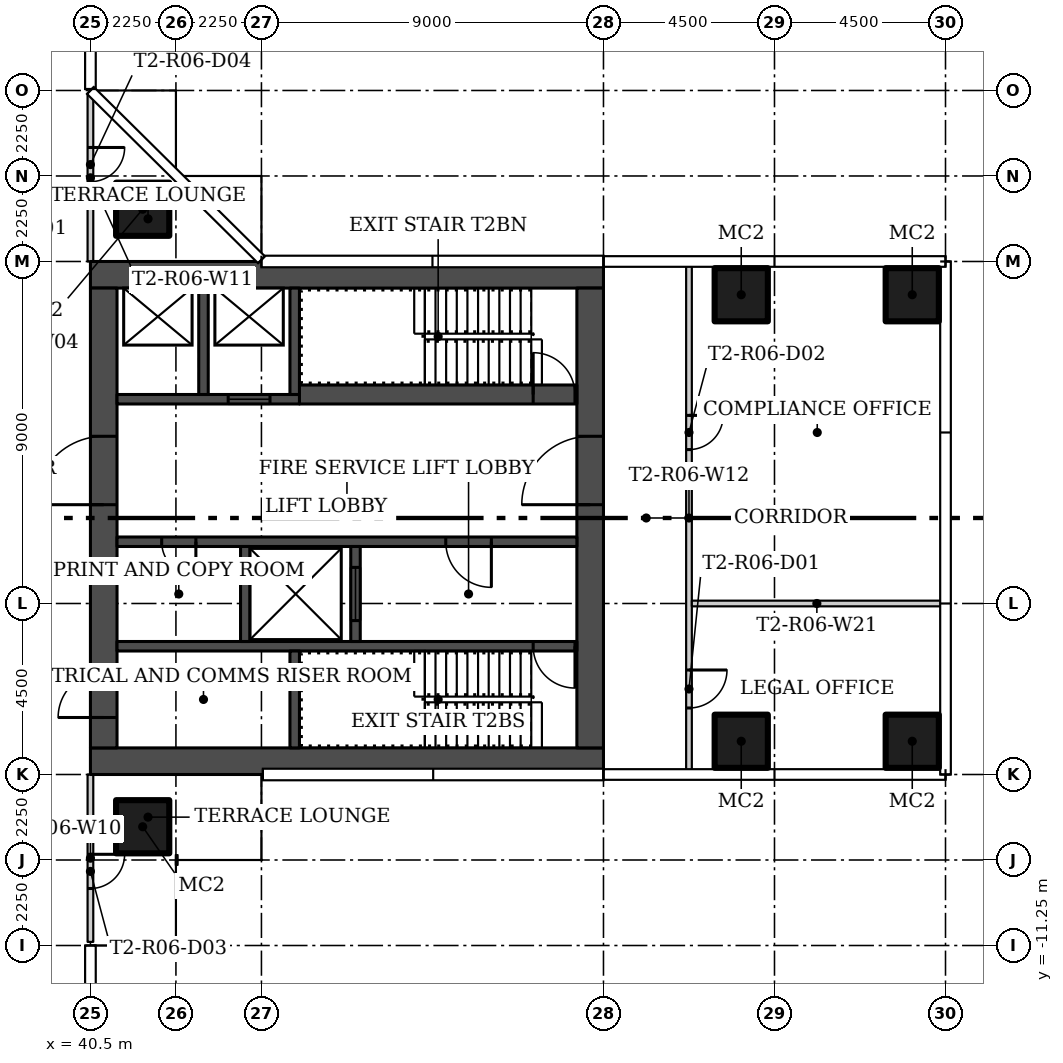
"""IFC4 building model, lengths in metres.
Left out: names, types, materials, properties, quantities, classifications, styles, units other than length and angle.
Written with IfcOpenShell. Run it as: python <this file> out.ifc"""

import sys

from ifc_helpers import new_model, si_unit, direction, frame, frame_2d, origin, origin_2d, place, context, subcontext, project, spatial, rectangle, hollow_rectangle, extrude, element, fill, save


model = new_model("IFC4")
c1 = context("Model", 3, precision=1e-05, world=origin(), true_north=direction((0.0, 1.0)))
c2 = subcontext(c1, "Body", "Model", "MODEL_VIEW")
j1 = project(units=[si_unit("LENGTHUNIT", "METRE"), si_unit("PLANEANGLEUNIT", "RADIAN")], contexts=[c1])
p1 = place(None, origin())
s1 = spatial("IfcSite", under=j1, at=p1, CompositionType="ELEMENT")
p2 = place(p1, origin())
s2 = spatial("IfcBuilding", under=s1, at=p2, CompositionType="ELEMENT")
p3 = place(p2, frame((0.0, 0.0, 61.5)))
s3 = spatial("IfcBuildingStorey", under=s2, at=p3, CompositionType="ELEMENT", Elevation=61.5)
for number, where in (
    (1, (41.875, 8.125, 0.0)),
    (2, (41.875, -8.125, 0.0)),
    (3, (57.625, -5.875, 0.0)),
    (4, (62.125, -5.875, 0.0)),
    (5, (57.625, 5.875, 0.0)),
    (6, (62.125, 5.875, 0.0)),
):
    element("IfcColumn", number, at=place(p3, frame(where)), inside=s3, PredefinedType="COLUMN", context=c2, shape_type="SweptSolid", body=[
        extrude(hollow_rectangle(XDim=1.4, YDim=1.4, WallThickness=0.05, at=origin_2d()), origin(), (0.0, 0.0, 1.0), 3.55),
    ])
p4 = place(p3, frame((40.5, -6.75, 0.0), z_axis=(0.0, 0.0, 1.0), x_axis=(0.0, -1.0, 0.0)))
e7 = element("IfcWall", 7, at=p4, inside=s3, PredefinedType="PARTITIONING", context=c2, shape_type="SweptSolid", body=[
    extrude(rectangle(XDim=4.405, YDim=0.15, at=frame_2d((2.203, 0.0))), origin(), (0.0, 0.0, 1.0), 3.55),
])
p5 = place(p4, frame((2.1, 0.0, 0.0)))
e8 = element("IfcOpeningElement", 8, at=p5, cuts=e7, PredefinedType="OPENING", context=c2, shape_type="SweptSolid", body=[
    extrude(rectangle(XDim=0.9, YDim=2.1, at=frame_2d((0.45, 1.05))), frame((0.0, 0.085, 0.0), z_axis=(0.0, -1.0, 0.0), x_axis=(1.0, 0.0, 0.0)), (0.0, 0.0, 1.0), 0.17),
])
p6 = place(p3, frame((40.5, 11.155, 0.0), z_axis=(0.0, 0.0, 1.0), x_axis=(0.0, -1.0, 0.0)))
e9 = element("IfcWall", 9, at=p6, inside=s3, PredefinedType="PARTITIONING", context=c2, shape_type="SweptSolid", body=[
    extrude(rectangle(XDim=4.405, YDim=0.15, at=frame_2d((2.203, 0.0))), origin(), (0.0, 0.0, 1.0), 3.55),
])
p7 = place(p6, frame((1.405, 0.0, 0.0)))
e10 = element("IfcOpeningElement", 10, at=p7, cuts=e9, PredefinedType="OPENING", context=c2, shape_type="SweptSolid", body=[
    extrude(rectangle(XDim=0.9, YDim=2.1, at=frame_2d((0.45, 1.05))), frame((0.0, 0.085, 0.0), z_axis=(0.0, -1.0, 0.0), x_axis=(1.0, 0.0, 0.0)), (0.0, 0.0, 1.0), 0.17),
])
p8 = place(p3, frame((56.25, 6.655, 0.0), z_axis=(0.0, 0.0, 1.0), x_axis=(0.0, -1.0, 0.0)))
e11 = element("IfcWall", 11, at=p8, inside=s3, PredefinedType="PARTITIONING", context=c2, shape_type="SweptSolid", body=[
    extrude(rectangle(XDim=13.31, YDim=0.15, at=frame_2d((6.655, 0.0))), origin(), (0.0, 0.0, 1.0), 3.55),
])
p9 = place(p8, frame((10.655, 0.0, 0.0)))
e12 = element("IfcOpeningElement", 12, at=p9, cuts=e11, PredefinedType="OPENING", context=c2, shape_type="SweptSolid", body=[
    extrude(rectangle(XDim=1.0, YDim=2.4, at=frame_2d((0.5, 1.2))), frame((0.0, 0.085, 0.0), z_axis=(0.0, -1.0, 0.0), x_axis=(1.0, 0.0, 0.0)), (0.0, 0.0, 1.0), 0.17),
])
p10 = place(p8, frame((3.955, 0.0, 0.0)))
e13 = element("IfcOpeningElement", 13, at=p10, cuts=e11, PredefinedType="OPENING", context=c2, shape_type="SweptSolid", body=[
    extrude(rectangle(XDim=0.9, YDim=2.1, at=frame_2d((0.45, 1.05))), frame((0.0, 0.085, 0.0), z_axis=(0.0, -1.0, 0.0), x_axis=(1.0, 0.0, 0.0)), (0.0, 0.0, 1.0), 0.17),
])
p11 = place(p3, frame((62.905, -2.25, 0.0), z_axis=(0.0, 0.0, 1.0), x_axis=(-1.0, 0.0, 0.0)))
e14 = element("IfcWall", 14, at=p11, inside=s3, PredefinedType="PARTITIONING", context=c2, shape_type="SweptSolid", body=[
    extrude(rectangle(XDim=6.58, YDim=0.15, at=frame_2d((3.29, 0.0))), origin(), (0.0, 0.0, 1.0), 3.55),
])
for number, where, z_axis, x_axis in (
    (15, (54.0, -6.4, 0.0), (0.0, 0.0, 1.0), (-1.0, 0.0, 0.0)),
    (16, (54.0, 6.4, 0.0), (0.0, 0.0, 1.0), (-1.0, 0.0, 0.0)),
):
    element("IfcWall", number, at=place(p3, frame(where, z_axis=z_axis, x_axis=x_axis)), inside=s3, PredefinedType="SHEAR", context=c2, shape_type="SweptSolid", body=[
        extrude(rectangle(XDim=13.5, YDim=0.7, at=frame_2d((6.75, 0.0))), origin(), (0.0, 0.0, 1.0), 3.55),
    ])
p12 = place(p3, frame((53.65, -6.05, 0.0), z_axis=(0.0, 0.0, 1.0), x_axis=(0.0, 1.0, 0.0)))
e17 = element("IfcWall", 17, at=p12, inside=s3, PredefinedType="SHEAR", context=c2, shape_type="SweptSolid", body=[
    extrude(rectangle(XDim=12.1, YDim=0.7, at=frame_2d((6.05, 0.0))), origin(), (0.0, 0.0, 1.0), 3.55),
])
p13 = place(p12, frame((6.4, 0.0, 0.0)))
e18 = element("IfcOpeningElement", 18, at=p13, cuts=e17, PredefinedType="OPENING", context=c2, shape_type="SweptSolid", body=[
    extrude(rectangle(XDim=1.8, YDim=2.4, at=frame_2d((0.9, 1.2))), frame((0.0, 0.36, 0.0), z_axis=(0.0, -1.0, 0.0), x_axis=(1.0, 0.0, 0.0)), (0.0, 0.0, 1.0), 0.72),
])
p14 = place(p3, frame((40.85, -6.05, 0.0), z_axis=(0.0, 0.0, 1.0), x_axis=(0.0, 1.0, 0.0)))
e19 = element("IfcWall", 19, at=p14, inside=s3, PredefinedType="SHEAR", context=c2, shape_type="SweptSolid", body=[
    extrude(rectangle(XDim=12.1, YDim=0.7, at=frame_2d((6.05, 0.0))), origin(), (0.0, 0.0, 1.0), 3.55),
])
p15 = place(p14, frame((0.8, 0.0, 0.0)))
e20 = element("IfcOpeningElement", 20, at=p15, cuts=e19, PredefinedType="OPENING", context=c2, shape_type="SweptSolid", body=[
    extrude(rectangle(XDim=1.2, YDim=2.1, at=frame_2d((0.6, 1.05))), frame((0.0, 0.36, 0.0), z_axis=(0.0, -1.0, 0.0), x_axis=(1.0, 0.0, 0.0)), (0.0, 0.0, 1.0), 0.72),
])
p16 = place(p14, frame((6.4, 0.0, 0.0)))
e21 = element("IfcOpeningElement", 21, at=p16, cuts=e19, PredefinedType="OPENING", context=c2, shape_type="SweptSolid", body=[
    extrude(rectangle(XDim=1.8, YDim=2.4, at=frame_2d((0.9, 1.2))), frame((0.0, 0.36, 0.0), z_axis=(0.0, -1.0, 0.0), x_axis=(1.0, 0.0, 0.0)), (0.0, 0.0, 1.0), 0.72),
])
p17 = place(p3, frame((53.3, -3.375, 0.0), z_axis=(0.0, 0.0, 1.0), x_axis=(-1.0, 0.0, 0.0)))
e22 = element("IfcWall", 22, at=p17, inside=s3, PredefinedType="SHEAR", context=c2, shape_type="SweptSolid", body=[
    extrude(rectangle(XDim=12.1, YDim=0.25, at=frame_2d((6.05, 0.0))), origin(), (0.0, 0.0, 1.0), 3.55),
])
p18 = place(p17, frame((0.05, 0.0, 0.0)))
e23 = element("IfcOpeningElement", 23, at=p18, cuts=e22, PredefinedType="OPENING", context=c2, shape_type="SweptSolid", body=[
    extrude(rectangle(XDim=1.1, YDim=2.1, at=frame_2d((0.55, 1.05))), frame((0.0, 0.135, 0.0), z_axis=(0.0, -1.0, 0.0), x_axis=(1.0, 0.0, 0.0)), (0.0, 0.0, 1.0), 0.27),
])
p19 = place(p3, frame((45.875, -6.05, 0.0), z_axis=(0.0, 0.0, 1.0), x_axis=(0.0, 1.0, 0.0)))
e24 = element("IfcWall", 24, at=p19, inside=s3, PredefinedType="SHEAR", context=c2, shape_type="SweptSolid", body=[
    extrude(rectangle(XDim=2.55, YDim=0.25, at=frame_2d((1.275, 0.0))), origin(), (0.0, 0.0, 1.0), 3.55),
])
p20 = place(p3, frame((53.3, -0.625, 0.0), z_axis=(0.0, 0.0, 1.0), x_axis=(-1.0, 0.0, 0.0)))
e25 = element("IfcWall", 25, at=p20, inside=s3, PredefinedType="SHEAR", context=c2, shape_type="SweptSolid", body=[
    extrude(rectangle(XDim=12.1, YDim=0.25, at=frame_2d((6.05, 0.0))), origin(), (0.0, 0.0, 1.0), 3.55),
])
p21 = place(p20, frame((2.25, 0.0, 0.0)))
e26 = element("IfcOpeningElement", 26, at=p21, cuts=e25, PredefinedType="OPENING", context=c2, shape_type="SweptSolid", body=[
    extrude(rectangle(XDim=1.2, YDim=2.1, at=frame_2d((0.6, 1.05))), frame((0.0, 0.135, 0.0), z_axis=(0.0, -1.0, 0.0), x_axis=(1.0, 0.0, 0.0)), (0.0, 0.0, 1.0), 0.27),
])
p22 = place(p20, frame((10.025, 0.0, 0.0)))
e27 = element("IfcOpeningElement", 27, at=p22, cuts=e25, PredefinedType="OPENING", context=c2, shape_type="SweptSolid", body=[
    extrude(rectangle(XDim=0.9, YDim=2.1, at=frame_2d((0.45, 1.05))), frame((0.0, 0.135, 0.0), z_axis=(0.0, -1.0, 0.0), x_axis=(1.0, 0.0, 0.0)), (0.0, 0.0, 1.0), 0.27),
])
p23 = place(p3, frame((47.475, -3.25, 0.0), z_axis=(0.0, 0.0, 1.0), x_axis=(0.0, 1.0, 0.0)))
e28 = element("IfcWall", 28, at=p23, inside=s3, PredefinedType="SHEAR", context=c2, shape_type="SweptSolid", body=[
    extrude(rectangle(XDim=2.5, YDim=0.25, at=frame_2d((1.25, 0.0))), origin(), (0.0, 0.0, 1.0), 3.55),
])
p24 = place(p23, frame((0.55, 0.0, 0.0)))
e29 = element("IfcOpeningElement", 29, at=p24, cuts=e28, PredefinedType="OPENING", context=c2, shape_type="SweptSolid", body=[
    extrude(rectangle(XDim=1.4, YDim=2.4, at=frame_2d((0.7, 1.2))), frame((0.0, 0.135, 0.0), z_axis=(0.0, -1.0, 0.0), x_axis=(1.0, 0.0, 0.0)), (0.0, 0.0, 1.0), 0.27),
])
p25 = place(p3, frame((44.575, -3.25, 0.0), z_axis=(0.0, 0.0, 1.0), x_axis=(0.0, 1.0, 0.0)))
e30 = element("IfcWall", 30, at=p25, inside=s3, PredefinedType="SHEAR", context=c2, shape_type="SweptSolid", body=[
    extrude(rectangle(XDim=2.5, YDim=0.25, at=frame_2d((1.25, 0.0))), origin(), (0.0, 0.0, 1.0), 3.55),
])
p26 = place(p3, frame((46.0, 3.25, 0.0)))
e31 = element("IfcWall", 31, at=p26, inside=s3, PredefinedType="SHEAR", context=c2, shape_type="SweptSolid", body=[
    extrude(rectangle(XDim=7.3, YDim=0.5, at=frame_2d((3.65, 0.0))), origin(), (0.0, 0.0, 1.0), 3.55),
])
p27 = place(p26, frame((6.15, 0.0, 0.0)))
e32 = element("IfcOpeningElement", 32, at=p27, cuts=e31, PredefinedType="OPENING", context=c2, shape_type="SweptSolid", body=[
    extrude(rectangle(XDim=1.1, YDim=2.1, at=frame_2d((0.55, 1.05))), frame((0.0, 0.26, 0.0), z_axis=(0.0, -1.0, 0.0), x_axis=(1.0, 0.0, 0.0)), (0.0, 0.0, 1.0), 0.52),
])
p28 = place(p3, frame((46.0, 3.125, 0.0), z_axis=(0.0, 0.0, 1.0), x_axis=(-1.0, 0.0, 0.0)))
e33 = element("IfcWall", 33, at=p28, inside=s3, PredefinedType="SHEAR", context=c2, shape_type="SweptSolid", body=[
    extrude(rectangle(XDim=4.8, YDim=0.25, at=frame_2d((2.4, 0.0))), origin(), (0.0, 0.0, 1.0), 3.55),
])
p29 = place(p28, frame((0.775, 0.0, 0.0)))
e34 = element("IfcOpeningElement", 34, at=p29, cuts=e33, PredefinedType="OPENING", context=c2, shape_type="SweptSolid", body=[
    extrude(rectangle(XDim=1.1, YDim=2.1, at=frame_2d((0.55, 1.05))), frame((0.0, 0.135, 0.0), z_axis=(0.0, -1.0, 0.0), x_axis=(1.0, 0.0, 0.0)), (0.0, 0.0, 1.0), 0.27),
])
for number, where, z_axis, x_axis in (
    (35, (45.875, 3.25, 0.0), (0.0, 0.0, 1.0), (0.0, 1.0, 0.0)),
    (36, (43.475, 3.25, 0.0), (0.0, 0.0, 1.0), (0.0, 1.0, 0.0)),
):
    element("IfcWall", number, at=place(p3, frame(where, z_axis=z_axis, x_axis=x_axis)), inside=s3, PredefinedType="SHEAR", context=c2, shape_type="SweptSolid", body=[
        extrude(rectangle(XDim=2.8, YDim=0.25, at=frame_2d((1.4, 0.0))), origin(), (0.0, 0.0, 1.0), 3.55),
    ])
p30 = place(p9, origin())
e37 = element("IfcDoor", 37, at=p30, inside=s3, OperationType="SINGLE_SWING_LEFT", PredefinedType="DOOR", context=c2, shape_type="SweptSolid", body=[
    extrude(rectangle(XDim=1.0, YDim=2.4, at=frame_2d((0.5, 1.2))), frame((0.0, 0.025, 0.0), z_axis=(0.0, -1.0, 0.0), x_axis=(1.0, 0.0, 0.0)), (0.0, 0.0, 1.0), 0.05),
])
fill(e12, e37)
p31 = place(p10, origin())
e38 = element("IfcDoor", 38, at=p31, inside=s3, OperationType="SINGLE_SWING_RIGHT", PredefinedType="DOOR", context=c2, shape_type="SweptSolid", body=[
    extrude(rectangle(XDim=0.9, YDim=2.1, at=frame_2d((0.45, 1.05))), frame((0.0, 0.025, 0.0), z_axis=(0.0, -1.0, 0.0), x_axis=(1.0, 0.0, 0.0)), (0.0, 0.0, 1.0), 0.05),
])
fill(e13, e38)
p32 = place(p5, origin())
e39 = element("IfcDoor", 39, at=p32, inside=s3, OperationType="SINGLE_SWING_RIGHT", PredefinedType="DOOR", context=c2, shape_type="SweptSolid", body=[
    extrude(rectangle(XDim=0.9, YDim=2.1, at=frame_2d((0.45, 1.05))), frame((0.0, 0.025, 0.0), z_axis=(0.0, -1.0, 0.0), x_axis=(1.0, 0.0, 0.0)), (0.0, 0.0, 1.0), 0.05),
])
fill(e8, e39)
p33 = place(p7, origin())
e40 = element("IfcDoor", 40, at=p33, inside=s3, OperationType="SINGLE_SWING_LEFT", PredefinedType="DOOR", context=c2, shape_type="SweptSolid", body=[
    extrude(rectangle(XDim=0.9, YDim=2.1, at=frame_2d((0.45, 1.05))), frame((0.0, 0.025, 0.0), z_axis=(0.0, -1.0, 0.0), x_axis=(1.0, 0.0, 0.0)), (0.0, 0.0, 1.0), 0.05),
])
fill(e10, e40)
p34 = place(p13, origin())
e41 = element("IfcDoor", 41, at=p34, inside=s3, OperationType="DOUBLE_DOOR_SINGLE_SWING", PredefinedType="DOOR", context=c2, shape_type="SweptSolid", body=[
    extrude(rectangle(XDim=1.8, YDim=2.4, at=frame_2d((0.9, 1.2))), frame((0.0, 0.025, 0.0), z_axis=(0.0, -1.0, 0.0), x_axis=(1.0, 0.0, 0.0)), (0.0, 0.0, 1.0), 0.05),
])
fill(e18, e41)
p35 = place(p15, origin())
e42 = element("IfcDoor", 42, at=p35, inside=s3, OperationType="SINGLE_SWING_LEFT", PredefinedType="DOOR", context=c2, shape_type="SweptSolid", body=[
    extrude(rectangle(XDim=1.2, YDim=2.1, at=frame_2d((0.6, 1.05))), frame((0.0, 0.025, 0.0), z_axis=(0.0, -1.0, 0.0), x_axis=(1.0, 0.0, 0.0)), (0.0, 0.0, 1.0), 0.05),
])
fill(e20, e42)
p36 = place(p16, origin())
e43 = element("IfcDoor", 43, at=p36, inside=s3, OperationType="DOUBLE_DOOR_SINGLE_SWING", PredefinedType="DOOR", context=c2, shape_type="SweptSolid", body=[
    extrude(rectangle(XDim=1.8, YDim=2.4, at=frame_2d((0.9, 1.2))), frame((0.0, 0.025, 0.0), z_axis=(0.0, -1.0, 0.0), x_axis=(1.0, 0.0, 0.0)), (0.0, 0.0, 1.0), 0.05),
])
fill(e21, e43)
p37 = place(p18, origin())
e44 = element("IfcDoor", 44, at=p37, inside=s3, OperationType="SINGLE_SWING_LEFT", PredefinedType="DOOR", context=c2, shape_type="SweptSolid", body=[
    extrude(rectangle(XDim=1.1, YDim=2.1, at=frame_2d((0.55, 1.05))), frame((0.0, 0.025, 0.0), z_axis=(0.0, -1.0, 0.0), x_axis=(1.0, 0.0, 0.0)), (0.0, 0.0, 1.0), 0.05),
])
fill(e23, e44)
p38 = place(p21, origin())
e45 = element("IfcDoor", 45, at=p38, inside=s3, OperationType="SINGLE_SWING_LEFT", PredefinedType="DOOR", context=c2, shape_type="SweptSolid", body=[
    extrude(rectangle(XDim=1.2, YDim=2.1, at=frame_2d((0.6, 1.05))), frame((0.0, 0.025, 0.0), z_axis=(0.0, -1.0, 0.0), x_axis=(1.0, 0.0, 0.0)), (0.0, 0.0, 1.0), 0.05),
])
fill(e26, e45)
p39 = place(p22, origin())
e46 = element("IfcDoor", 46, at=p39, inside=s3, OperationType="SINGLE_SWING_RIGHT", PredefinedType="DOOR", context=c2, shape_type="SweptSolid", body=[
    extrude(rectangle(XDim=0.9, YDim=2.1, at=frame_2d((0.45, 1.05))), frame((0.0, 0.025, 0.0), z_axis=(0.0, -1.0, 0.0), x_axis=(1.0, 0.0, 0.0)), (0.0, 0.0, 1.0), 0.05),
])
fill(e27, e46)
p40 = place(p24, origin())
e47 = element("IfcDoor", 47, at=p40, inside=s3, OperationType="SLIDING_TO_LEFT", PredefinedType="DOOR", context=c2, shape_type="SweptSolid", body=[
    extrude(rectangle(XDim=1.4, YDim=2.4, at=frame_2d((0.7, 1.2))), frame((0.0, 0.025, 0.0), z_axis=(0.0, -1.0, 0.0), x_axis=(1.0, 0.0, 0.0)), (0.0, 0.0, 1.0), 0.05),
])
fill(e29, e47)
p41 = place(p27, origin())
e48 = element("IfcDoor", 48, at=p41, inside=s3, OperationType="SINGLE_SWING_RIGHT", PredefinedType="DOOR", context=c2, shape_type="SweptSolid", body=[
    extrude(rectangle(XDim=1.1, YDim=2.1, at=frame_2d((0.55, 1.05))), frame((0.0, 0.025, 0.0), z_axis=(0.0, -1.0, 0.0), x_axis=(1.0, 0.0, 0.0)), (0.0, 0.0, 1.0), 0.05),
])
fill(e32, e48)
p42 = place(p29, origin())
e49 = element("IfcDoor", 49, at=p42, inside=s3, OperationType="SLIDING_TO_LEFT", PredefinedType="DOOR", context=c2, shape_type="SweptSolid", body=[
    extrude(rectangle(XDim=1.1, YDim=2.1, at=frame_2d((0.55, 1.05))), frame((0.0, 0.025, 0.0), z_axis=(0.0, -1.0, 0.0), x_axis=(1.0, 0.0, 0.0)), (0.0, 0.0, 1.0), 0.05),
])
fill(e34, e49)
save(model, sys.argv[1])
